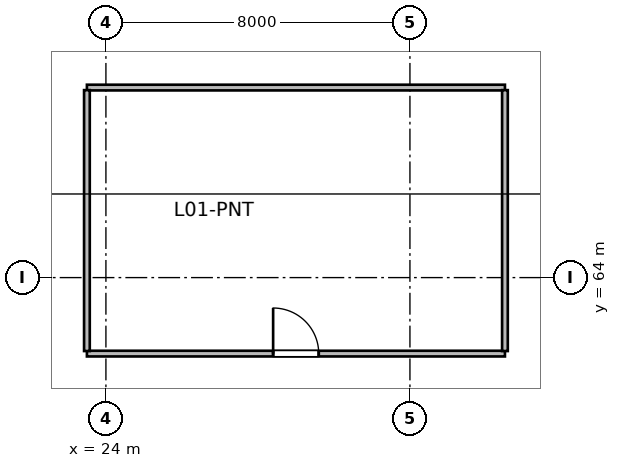
"""IFC4 building model, lengths in metres.
Left out: names, types, materials, properties, quantities, classifications, styles, units other than length and angle.
Written with IfcOpenShell. Run it as: python <this file> out.ifc"""

import sys

from ifc_helpers import new_model, si_unit, direction, frame, frame_2d, origin, place, context, subcontext, project, spatial, rectangle, extrude, source, transform, mapped, element, fill, save


model = new_model("IFC4")
c1 = context("Model", 3, precision=1e-05, world=origin(), true_north=direction((0.0, 1.0)))
c2 = subcontext(c1, "Body", "Model", "MODEL_VIEW")
j1 = project(units=[si_unit("LENGTHUNIT", "METRE"), si_unit("PLANEANGLEUNIT", "RADIAN")], contexts=[c1])
p1 = place(None, origin())
s1 = spatial("IfcSite", under=j1, at=p1, CompositionType="ELEMENT")
p2 = place(p1, origin())
s2 = spatial("IfcBuilding", under=s1, at=p2, CompositionType="ELEMENT")
p3 = place(p2, frame((0.0, 0.0, 6.0)))
s3 = spatial("IfcBuildingStorey", under=s2, at=p3, CompositionType="ELEMENT", Elevation=6.0)
m1 = source(origin(), c2, "Body", "SweptSolid", [
    extrude(rectangle(XDim=11.0, YDim=0.15, at=frame_2d((5.5, 0.0))), origin(), (0.0, 0.0, 1.0), 5.7),
])
p4 = place(p3, frame((23.5, 62.0, 0.0), z_axis=(0.0, 0.0, 1.0), x_axis=(1.0, 0.0, 0.0)))
e1 = element("IfcWall", 1, at=p4, inside=s3, PredefinedType="PARTITIONING", context=c2, shape_type="MappedRepresentation", body=[
    mapped(m1, transform((0.0, 0.0, 0.0), scale=1.0)),
])
p5 = place(p4, frame((4.9, 0.0, 0.0)))
e2 = element("IfcOpeningElement", 2, at=p5, cuts=e1, PredefinedType="OPENING", context=c2, shape_type="SweptSolid", body=[
    extrude(rectangle(XDim=1.2, YDim=2.15, at=frame_2d((0.6, 1.075))), frame((0.0, 0.085, 0.0), z_axis=(0.0, -1.0, 0.0), x_axis=(1.0, 0.0, 0.0)), (0.0, 0.0, 1.0), 0.17),
])
m2 = source(origin(), c2, "Body", "SweptSolid", [
    extrude(rectangle(XDim=11.0, YDim=0.15, at=frame_2d((5.5, 0.0))), origin(), (0.0, 0.0, 1.0), 4.761),
])
p6 = place(p3, frame((23.5, 69.0, 0.0), z_axis=(0.0, 0.0, 1.0), x_axis=(1.0, 0.0, 0.0)))
e3 = element("IfcWall", 3, at=p6, inside=s3, PredefinedType="PARTITIONING", context=c2, shape_type="MappedRepresentation", body=[
    mapped(m2, transform((0.0, 0.0, 0.0), scale=1.0)),
])
m3 = source(origin(), c2, "Body", "SweptSolid", [
    extrude(rectangle(XDim=6.865, YDim=0.15, at=frame_2d((3.433, 0.0))), origin(), (0.0, 0.0, 1.0), 5.7),
])
for number, where, z_axis, x_axis in (
    (4, (23.5, 62.067, 0.0), (0.0, 0.0, 1.0), (0.0, 1.0, 0.0)),
    (5, (34.5, 62.067, 0.0), (0.0, 0.0, 1.0), (0.0, 1.0, 0.0)),
):
    element("IfcWall", number, at=place(p3, frame(where, z_axis=z_axis, x_axis=x_axis)), inside=s3, PredefinedType="PARTITIONING", context=c2, shape_type="MappedRepresentation", body=[
        mapped(m3, transform((0.0, 0.0, 0.0), scale=1.0)),
    ])
m4 = source(origin(), c2, "Body", "SweptSolid", [
    extrude(rectangle(XDim=1.2, YDim=2.15, at=frame_2d((0.6, 1.075))), frame((0.0, 0.025, 0.0), z_axis=(0.0, -1.0, 0.0), x_axis=(1.0, 0.0, 0.0)), (0.0, 0.0, 1.0), 0.05),
])
p7 = place(p5, origin())
e6 = element("IfcDoor", 6, at=p7, inside=s3, OperationType="SINGLE_SWING_LEFT", PredefinedType="DOOR", context=c2, shape_type="MappedRepresentation", body=[
    mapped(m4, transform((0.0, 0.0, 0.0), scale=1.0)),
])
fill(e2, e6)
save(model, sys.argv[1])
